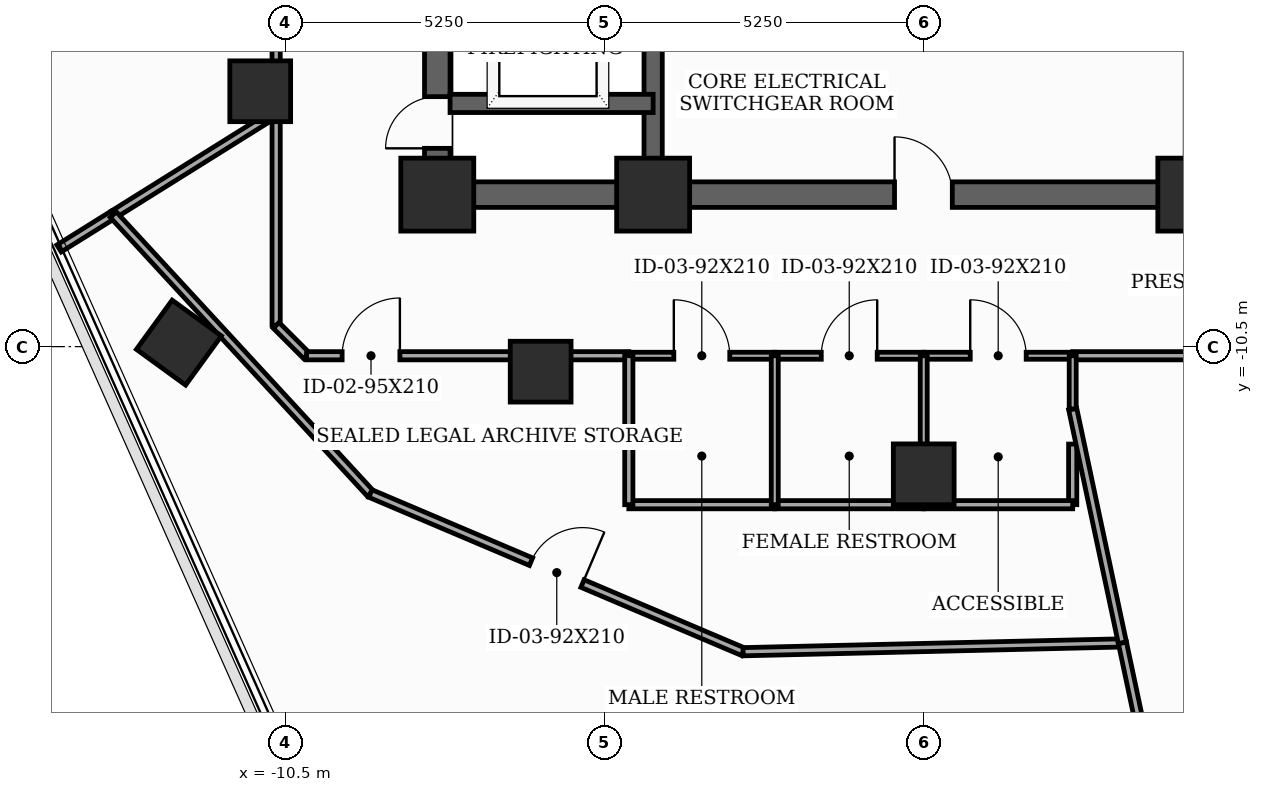
"""IFC4 building model, lengths in metres.
Left out: names, types, materials, properties, quantities, classifications, styles, units other than length and angle.
Written with IfcOpenShell. Run it as: python <this file> out.ifc"""

import sys

from ifc_helpers import new_model, si_unit, direction, frame, frame_2d, origin, origin_2d, place, context, subcontext, project, spatial, rectangle, extrude, element, fill, save


model = new_model("IFC4")
c1 = context("Model", 3, precision=1e-05, world=origin(), true_north=direction((0.0, 1.0)))
c2 = subcontext(c1, "Body", "Model", "MODEL_VIEW")
j1 = project(units=[si_unit("LENGTHUNIT", "METRE"), si_unit("PLANEANGLEUNIT", "RADIAN")], contexts=[c1])
p1 = place(None, origin())
s1 = spatial("IfcSite", under=j1, at=p1, CompositionType="ELEMENT")
p2 = place(p1, origin())
s2 = spatial("IfcBuilding", under=s1, at=p2, CompositionType="ELEMENT")
p3 = place(p2, frame((0.0, 0.0, 218.9)))
s3 = spatial("IfcBuildingStorey", under=s2, at=p3, CompositionType="ELEMENT", Elevation=218.9)
for number, where, z_axis, x_axis in (
    (1, (-8.0, -8.0, 0.0), (0.0, 0.0, 1.0), (1.0, 0.0, 0.0)),
    (2, (-4.45, -8.0, 0.0), (0.0, 0.0, 1.0), (1.0, 0.0, 0.0)),
    (3, (4.45, -8.0, 0.0), (0.0, 0.0, 1.0), (1.0, 0.0, 0.0)),
):
    element("IfcColumn", number, at=place(p3, frame(where, z_axis=z_axis, x_axis=x_axis)), inside=s3, PredefinedType="COLUMN", context=c2, shape_type="SweptSolid", body=[
        extrude(rectangle(XDim=1.2, YDim=1.2, at=origin_2d()), origin(), (0.0, 0.0, 1.0), 3.7),
    ])
for number, where, z_axis, x_axis in (
    (4, (-10.912, -6.3, 0.0), (0.0, 0.0, 1.0), (1.0, 0.0, 0.0)),
    (5, (-6.3, -10.912, 0.0), (0.0, 0.0, 1.0), (1.0, 0.0, 0.0)),
    (6, (0.0, -12.6, 0.0), (0.0, 0.0, 1.0), (1.0, 0.0, 0.0)),
    (7, (-12.25, -10.435, 0.0), (0.0, 0.0, 1.0), (0.588, 0.809, 0.0)),
):
    element("IfcColumn", number, at=place(p3, frame(where, z_axis=z_axis, x_axis=x_axis)), inside=s3, PredefinedType="COLUMN", context=c2, shape_type="SweptSolid", body=[
        extrude(rectangle(XDim=1.0, YDim=1.0, at=origin_2d()), origin(), (0.0, 0.0, 1.0), 3.7),
    ])
p4 = place(p3, frame((-8.0, -8.0, 0.0), z_axis=(0.0, 0.0, 1.0), x_axis=(0.0, 1.0, 0.0)))
e8 = element("IfcWall", 8, at=p4, inside=s3, PredefinedType="SHEAR", context=c2, shape_type="SweptSolid", body=[
    extrude(rectangle(XDim=16.0, YDim=0.42, at=frame_2d((8.0, 0.0))), origin(), (0.0, 0.0, 1.0), 3.5),
])
p5 = place(p4, frame((0.761, 0.0, 0.0)))
e9 = element("IfcOpeningElement", 9, at=p5, cuts=e8, PredefinedType="OPENING", context=c2, shape_type="SweptSolid", body=[
    extrude(rectangle(XDim=0.85, YDim=2.02, at=frame_2d((0.425, 1.01))), frame((0.0, 0.22, 0.0), z_axis=(0.0, -1.0, 0.0), x_axis=(1.0, 0.0, 0.0)), (0.0, 0.0, 1.0), 0.44),
])
p6 = place(p4, frame((5.35, 0.0, 0.0)))
e10 = element("IfcOpeningElement", 10, at=p6, cuts=e8, PredefinedType="OPENING", context=c2, shape_type="SweptSolid", body=[
    extrude(rectangle(XDim=1.05, YDim=2.15, at=frame_2d((0.525, 1.075))), frame((0.0, 0.22, 0.0), z_axis=(0.0, -1.0, 0.0), x_axis=(1.0, 0.0, 0.0)), (0.0, 0.0, 1.0), 0.44),
])
p7 = place(p3, frame((-8.0, -8.0, 0.0), z_axis=(0.0, 0.0, 1.0), x_axis=(1.0, 0.0, 0.0)))
e11 = element("IfcWall", 11, at=p7, inside=s3, PredefinedType="SHEAR", context=c2, shape_type="SweptSolid", body=[
    extrude(rectangle(XDim=16.0, YDim=0.42, at=frame_2d((8.0, 0.0))), origin(), (0.0, 0.0, 1.0), 3.5),
])
p8 = place(p7, frame((7.52, 0.0, 0.0)))
e12 = element("IfcOpeningElement", 12, at=p8, cuts=e11, PredefinedType="OPENING", context=c2, shape_type="SweptSolid", body=[
    extrude(rectangle(XDim=0.95, YDim=2.1, at=frame_2d((0.475, 1.05))), frame((0.0, 0.22, 0.0), z_axis=(0.0, -1.0, 0.0), x_axis=(1.0, 0.0, 0.0)), (0.0, 0.0, 1.0), 0.44),
])
p9 = place(p3, frame((-4.45, -7.79, 0.0), z_axis=(0.0, 0.0, 1.0), x_axis=(0.0, 1.0, 0.0)))
e13 = element("IfcWall", 13, at=p9, inside=s3, PredefinedType="SHEAR", context=c2, shape_type="SweptSolid", body=[
    extrude(rectangle(XDim=15.58, YDim=0.3, at=frame_2d((7.79, 0.0))), origin(), (0.0, 0.0, 1.0), 3.5),
])
p10 = place(p3, frame((-7.79, -6.5, 0.0), z_axis=(0.0, 0.0, 1.0), x_axis=(1.0, 0.0, 0.0)))
e14 = element("IfcWall", 14, at=p10, inside=s3, PredefinedType="SHEAR", context=c2, shape_type="SweptSolid", body=[
    extrude(rectangle(XDim=3.34, YDim=0.3, at=frame_2d((1.67, 0.0))), origin(), (0.0, 0.0, 1.0), 3.5),
])
p11 = place(p3, frame((-10.65, -4.225, 0.0), z_axis=(0.0, 0.0, 1.0), x_axis=(0.0, -1.0, 0.0)))
e15 = element("IfcWall", 15, at=p11, inside=s3, PredefinedType="PARTITIONING", context=c2, shape_type="SweptSolid", body=[
    extrude(rectangle(XDim=2.43, YDim=0.135, at=frame_2d((1.215, 0.0))), origin(), (0.0, 0.0, 1.0), 2.885),
])
p12 = place(p3, frame((-10.65, -6.655, 0.0), z_axis=(0.0, 0.0, 1.0), x_axis=(0.0, -1.0, 0.0)))
e16 = element("IfcWall", 16, at=p12, inside=s3, PredefinedType="PARTITIONING", context=c2, shape_type="SweptSolid", body=[
    extrude(rectangle(XDim=3.495, YDim=0.135, at=frame_2d((1.748, 0.0))), origin(), (0.0, 0.0, 1.0), 2.885),
])
p13 = place(p3, frame((-10.65, -10.15, 0.0), z_axis=(0.0, 0.0, 1.0), x_axis=(0.707106781187, -0.707106781187, 0.0)))
e17 = element("IfcWall", 17, at=p13, inside=s3, PredefinedType="PARTITIONING", context=c2, shape_type="SweptSolid", body=[
    extrude(rectangle(XDim=0.707, YDim=0.135, at=frame_2d((0.354, 0.0))), origin(), (0.0, 0.0, 1.0), 3.5),
])
p14 = place(p3, frame((-10.15, -10.65, 0.0), z_axis=(0.0, 0.0, 1.0), x_axis=(1.0, 0.0, 0.0)))
e18 = element("IfcWall", 18, at=p14, inside=s3, PredefinedType="PARTITIONING", context=c2, shape_type="SweptSolid", body=[
    extrude(rectangle(XDim=5.3, YDim=0.135, at=frame_2d((2.65, 0.0))), origin(), (0.0, 0.0, 1.0), 2.885),
])
p15 = place(p14, frame((0.585, 0.0, 0.0)))
e19 = element("IfcOpeningElement", 19, at=p15, cuts=e18, PredefinedType="OPENING", context=c2, shape_type="SweptSolid", body=[
    extrude(rectangle(XDim=0.95, YDim=2.1, at=frame_2d((0.475, 1.05))), frame((0.0, 0.077, 0.0), z_axis=(0.0, -1.0, 0.0), x_axis=(1.0, 0.0, 0.0)), (0.0, 0.0, 1.0), 0.155),
])
p16 = place(p3, frame((-4.85, -10.65, 0.0), z_axis=(0.0, 0.0, 1.0), x_axis=(1.0, 0.0, 0.0)))
e20 = element("IfcWall", 20, at=p16, inside=s3, PredefinedType="PARTITIONING", context=c2, shape_type="SweptSolid", body=[
    extrude(rectangle(XDim=2.4, YDim=0.115, at=frame_2d((1.2, 0.0))), origin(), (0.0, 0.0, 1.0), 3.5),
])
p17 = place(p16, frame((0.74, 0.0, 0.0)))
e21 = element("IfcOpeningElement", 21, at=p17, cuts=e20, PredefinedType="OPENING", context=c2, shape_type="SweptSolid", body=[
    extrude(rectangle(XDim=0.92, YDim=2.1, at=frame_2d((0.46, 1.05))), frame((0.0, 0.067, 0.0), z_axis=(0.0, -1.0, 0.0), x_axis=(1.0, 0.0, 0.0)), (0.0, 0.0, 1.0), 0.135),
])
p18 = place(p3, frame((-2.45, -10.65, 0.0), z_axis=(0.0, 0.0, 1.0), x_axis=(1.0, 0.0, 0.0)))
e22 = element("IfcWall", 22, at=p18, inside=s3, PredefinedType="PARTITIONING", context=c2, shape_type="SweptSolid", body=[
    extrude(rectangle(XDim=2.45, YDim=0.115, at=frame_2d((1.225, 0.0))), origin(), (0.0, 0.0, 1.0), 2.885),
])
p19 = place(p18, frame((0.765, 0.0, 0.0)))
e23 = element("IfcOpeningElement", 23, at=p19, cuts=e22, PredefinedType="OPENING", context=c2, shape_type="SweptSolid", body=[
    extrude(rectangle(XDim=0.92, YDim=2.1, at=frame_2d((0.46, 1.05))), frame((0.0, 0.067, 0.0), z_axis=(0.0, -1.0, 0.0), x_axis=(1.0, 0.0, 0.0)), (0.0, 0.0, 1.0), 0.135),
])
p20 = place(p3, frame((0.0, -10.65, 0.0), z_axis=(0.0, 0.0, 1.0), x_axis=(1.0, 0.0, 0.0)))
e24 = element("IfcWall", 24, at=p20, inside=s3, PredefinedType="PARTITIONING", context=c2, shape_type="SweptSolid", body=[
    extrude(rectangle(XDim=2.45, YDim=0.115, at=frame_2d((1.225, 0.0))), origin(), (0.0, 0.0, 1.0), 3.5),
])
p21 = place(p20, frame((0.765, 0.0, 0.0)))
e25 = element("IfcOpeningElement", 25, at=p21, cuts=e24, PredefinedType="OPENING", context=c2, shape_type="SweptSolid", body=[
    extrude(rectangle(XDim=0.92, YDim=2.1, at=frame_2d((0.46, 1.05))), frame((0.0, 0.067, 0.0), z_axis=(0.0, -1.0, 0.0), x_axis=(1.0, 0.0, 0.0)), (0.0, 0.0, 1.0), 0.135),
])
p22 = place(p3, frame((2.45, -10.65, 0.0), z_axis=(0.0, 0.0, 1.0), x_axis=(1.0, 0.0, 0.0)))
e26 = element("IfcWall", 26, at=p22, inside=s3, PredefinedType="PARTITIONING", context=c2, shape_type="SweptSolid", body=[
    extrude(rectangle(XDim=7.7, YDim=0.135, at=frame_2d((3.85, 0.0))), origin(), (0.0, 0.0, 1.0), 2.885),
])
p23 = place(p3, frame((-13.329, -8.329, 0.0), z_axis=(0.0, 0.0, 1.0), x_axis=(0.848059079617, 0.529901686617, 0.0)))
e27 = element("IfcWall", 27, at=p23, inside=s3, PredefinedType="PARTITIONING", context=c2, shape_type="SweptSolid", body=[
    extrude(rectangle(XDim=3.159, YDim=0.135, at=frame_2d((1.58, 0.0))), origin(), (0.0, 0.0, 1.0), 2.885),
])
p24 = place(p3, frame((-14.22, -8.885, 0.0), z_axis=(0.0, 0.0, 1.0), x_axis=(0.848337621773, 0.529455644493, 0.0)))
e28 = element("IfcWall", 28, at=p24, inside=s3, PredefinedType="PARTITIONING", context=c2, shape_type="SweptSolid", body=[
    extrude(rectangle(XDim=1.051, YDim=0.135, at=frame_2d((0.525, 0.0))), origin(), (0.0, 0.0, 1.0), 3.035),
])
p25 = place(p3, frame((-2.45, -13.1, 0.0), z_axis=(0.0, 0.0, 1.0), x_axis=(-1.0, 0.0, 0.0)))
e29 = element("IfcWall", 29, at=p25, inside=s3, PredefinedType="PARTITIONING", context=c2, shape_type="SweptSolid", body=[
    extrude(rectangle(XDim=2.4, YDim=0.135, at=frame_2d((1.2, 0.0))), origin(), (0.0, 0.0, 1.0), 3.5),
])
p26 = place(p3, frame((-4.85, -13.1, 0.0), z_axis=(0.0, 0.0, 1.0), x_axis=(0.0, 1.0, 0.0)))
e30 = element("IfcWall", 30, at=p26, inside=s3, PredefinedType="PARTITIONING", context=c2, shape_type="SweptSolid", body=[
    extrude(rectangle(XDim=2.45, YDim=0.135, at=frame_2d((1.225, 0.0))), origin(), (0.0, 0.0, 1.0), 2.885),
])
p27 = place(p3, frame((-13.329, -8.329, 0.0), z_axis=(0.0, 0.0, 1.0), x_axis=(0.677841155448, -0.735208384052, 0.0)))
e31 = element("IfcWall", 31, at=p27, inside=s3, PredefinedType="PARTITIONING", context=c2, shape_type="SweptSolid", body=[
    extrude(rectangle(XDim=6.239, YDim=0.135, at=frame_2d((3.12, 0.0))), origin(), (0.0, 0.0, 1.0), 2.985),
])
p28 = place(p3, frame((-9.1, -12.916, 0.0), z_axis=(0.0, 0.0, 1.0), x_axis=(0.920506675175, -0.390726836752, 0.0)))
e32 = element("IfcWall", 32, at=p28, inside=s3, PredefinedType="PARTITIONING", context=c2, shape_type="SweptSolid", body=[
    extrude(rectangle(XDim=6.659, YDim=0.135, at=frame_2d((3.33, 0.0))), origin(), (0.0, 0.0, 1.0), 2.985),
])
p29 = place(p28, frame((2.87, 0.0, 0.0)))
e33 = element("IfcOpeningElement", 33, at=p29, cuts=e32, PredefinedType="OPENING", context=c2, shape_type="SweptSolid", body=[
    extrude(rectangle(XDim=0.92, YDim=2.1, at=frame_2d((0.46, 1.05))), frame((0.0, 0.077, 0.0), z_axis=(0.0, -1.0, 0.0), x_axis=(1.0, 0.0, 0.0)), (0.0, 0.0, 1.0), 0.155),
])
p30 = place(p3, frame((-2.97, -15.518, 0.0), z_axis=(0.0, 0.0, 1.0), x_axis=(0.99972988351, 0.023241342836, 0.0)))
e34 = element("IfcWall", 34, at=p30, inside=s3, PredefinedType="PARTITIONING", context=c2, shape_type="SweptSolid", body=[
    extrude(rectangle(XDim=6.24, YDim=0.135, at=frame_2d((3.12, 0.0))), origin(), (0.0, 0.0, 1.0), 2.985),
])
p31 = place(p3, frame((0.0, -13.1, 0.0), z_axis=(0.0, 0.0, 1.0), x_axis=(-1.0, 0.0, 0.0)))
e35 = element("IfcWall", 35, at=p31, inside=s3, PredefinedType="PARTITIONING", context=c2, shape_type="SweptSolid", body=[
    extrude(rectangle(XDim=2.45, YDim=0.135, at=frame_2d((1.225, 0.0))), origin(), (0.0, 0.0, 1.0), 3.5),
])
p32 = place(p3, frame((2.45, -12.103, 0.0), z_axis=(0.0, 0.0, 1.0), x_axis=(0.0, -1.0, 0.0)))
e36 = element("IfcWall", 36, at=p32, inside=s3, PredefinedType="PARTITIONING", context=c2, shape_type="SweptSolid", body=[
    extrude(rectangle(XDim=0.997, YDim=0.135, at=frame_2d((0.499, 0.0))), origin(), (0.0, 0.0, 1.0), 2.885),
])
p33 = place(p3, frame((2.45, -13.1, 0.0), z_axis=(0.0, 0.0, 1.0), x_axis=(-1.0, 0.0, 0.0)))
e37 = element("IfcWall", 37, at=p33, inside=s3, PredefinedType="PARTITIONING", context=c2, shape_type="SweptSolid", body=[
    extrude(rectangle(XDim=2.45, YDim=0.135, at=frame_2d((1.225, 0.0))), origin(), (0.0, 0.0, 1.0), 2.985),
])
p34 = place(p3, frame((3.268, -15.373, 0.0), z_axis=(0.0, 0.0, 1.0), x_axis=(-0.208002774368, 0.978128235895, 0.0)))
e38 = element("IfcWall", 38, at=p34, inside=s3, PredefinedType="PARTITIONING", context=c2, shape_type="SweptSolid", body=[
    extrude(rectangle(XDim=3.933, YDim=0.135, at=frame_2d((1.967, 0.0))), origin(), (0.0, 0.0, 1.0), 2.885),
])
p35 = place(p3, frame((-2.45, -13.1, 0.0), z_axis=(0.0, 0.0, 1.0), x_axis=(0.0, 1.0, 0.0)))
e39 = element("IfcWall", 39, at=p35, inside=s3, PredefinedType="PARTITIONING", context=c2, shape_type="SweptSolid", body=[
    extrude(rectangle(XDim=2.45, YDim=0.115, at=frame_2d((1.225, 0.0))), origin(), (0.0, 0.0, 1.0), 2.885),
])
p36 = place(p3, frame((4.645, -21.856, 0.0), z_axis=(0.0, 0.0, 1.0), x_axis=(-0.207797956892, 0.978171768715, 0.0)))
e40 = element("IfcWall", 40, at=p36, inside=s3, PredefinedType="PARTITIONING", context=c2, shape_type="SweptSolid", body=[
    extrude(rectangle(XDim=6.628, YDim=0.135, at=frame_2d((3.314, 0.0))), origin(), (0.0, 0.0, 1.0), 2.985),
])
p37 = place(p3, frame((0.0, -13.1, 0.0), z_axis=(0.0, 0.0, 1.0), x_axis=(0.0, 1.0, 0.0)))
e41 = element("IfcWall", 41, at=p37, inside=s3, PredefinedType="PARTITIONING", context=c2, shape_type="SweptSolid", body=[
    extrude(rectangle(XDim=2.45, YDim=0.115, at=frame_2d((1.225, 0.0))), origin(), (0.0, 0.0, 1.0), 2.885),
])
p38 = place(p3, frame((2.45, -11.526, 0.0), z_axis=(0.0, 0.0, 1.0), x_axis=(0.0, 1.0, 0.0)))
e42 = element("IfcWall", 42, at=p38, inside=s3, PredefinedType="PARTITIONING", context=c2, shape_type="SweptSolid", body=[
    extrude(rectangle(XDim=0.876, YDim=0.115, at=frame_2d((0.438, 0.0))), origin(), (0.0, 0.0, 1.0), 3.5),
])
p39 = place(p5, origin())
e43 = element("IfcDoor", 43, at=p39, inside=s3, OperationType="SINGLE_SWING_LEFT", PredefinedType="TRAPDOOR", context=c2, shape_type="SweptSolid", body=[
    extrude(rectangle(XDim=0.85, YDim=2.02, at=frame_2d((0.425, 1.01))), frame((0.0, 0.025, 0.0), z_axis=(0.0, -1.0, 0.0), x_axis=(1.0, 0.0, 0.0)), (0.0, 0.0, 1.0), 0.05),
])
fill(e9, e43)
p40 = place(p8, origin())
e44 = element("IfcDoor", 44, at=p40, inside=s3, OperationType="SINGLE_SWING_LEFT", PredefinedType="DOOR", context=c2, shape_type="SweptSolid", body=[
    extrude(rectangle(XDim=0.95, YDim=2.1, at=frame_2d((0.475, 1.05))), frame((0.0, 0.025, 0.0), z_axis=(0.0, -1.0, 0.0), x_axis=(1.0, 0.0, 0.0)), (0.0, 0.0, 1.0), 0.05),
])
fill(e12, e44)
p41 = place(p15, origin())
e45 = element("IfcDoor", 45, at=p41, inside=s3, OperationType="SINGLE_SWING_RIGHT", PredefinedType="DOOR", context=c2, shape_type="SweptSolid", body=[
    extrude(rectangle(XDim=0.95, YDim=2.1, at=frame_2d((0.475, 1.05))), frame((0.0, 0.025, 0.0), z_axis=(0.0, -1.0, 0.0), x_axis=(1.0, 0.0, 0.0)), (0.0, 0.0, 1.0), 0.05),
])
fill(e19, e45)
p42 = place(p17, origin())
e46 = element("IfcDoor", 46, at=p42, inside=s3, OperationType="SINGLE_SWING_LEFT", PredefinedType="DOOR", context=c2, shape_type="SweptSolid", body=[
    extrude(rectangle(XDim=0.92, YDim=2.1, at=frame_2d((0.46, 1.05))), frame((0.0, 0.025, 0.0), z_axis=(0.0, -1.0, 0.0), x_axis=(1.0, 0.0, 0.0)), (0.0, 0.0, 1.0), 0.05),
])
fill(e21, e46)
p43 = place(p19, origin())
e47 = element("IfcDoor", 47, at=p43, inside=s3, OperationType="SINGLE_SWING_RIGHT", PredefinedType="DOOR", context=c2, shape_type="SweptSolid", body=[
    extrude(rectangle(XDim=0.92, YDim=2.1, at=frame_2d((0.46, 1.05))), frame((0.0, 0.025, 0.0), z_axis=(0.0, -1.0, 0.0), x_axis=(1.0, 0.0, 0.0)), (0.0, 0.0, 1.0), 0.05),
])
fill(e23, e47)
p44 = place(p21, origin())
e48 = element("IfcDoor", 48, at=p44, inside=s3, OperationType="SINGLE_SWING_LEFT", PredefinedType="DOOR", context=c2, shape_type="SweptSolid", body=[
    extrude(rectangle(XDim=0.92, YDim=2.1, at=frame_2d((0.46, 1.05))), frame((0.0, 0.025, 0.0), z_axis=(0.0, -1.0, 0.0), x_axis=(1.0, 0.0, 0.0)), (0.0, 0.0, 1.0), 0.05),
])
fill(e25, e48)
p45 = place(p29, origin())
e49 = element("IfcDoor", 49, at=p45, inside=s3, OperationType="SINGLE_SWING_RIGHT", PredefinedType="DOOR", context=c2, shape_type="SweptSolid", body=[
    extrude(rectangle(XDim=0.92, YDim=2.1, at=frame_2d((0.46, 1.05))), frame((0.0, 0.025, 0.0), z_axis=(0.0, -1.0, 0.0), x_axis=(1.0, 0.0, 0.0)), (0.0, 0.0, 1.0), 0.05),
])
fill(e33, e49)
save(model, sys.argv[1])
